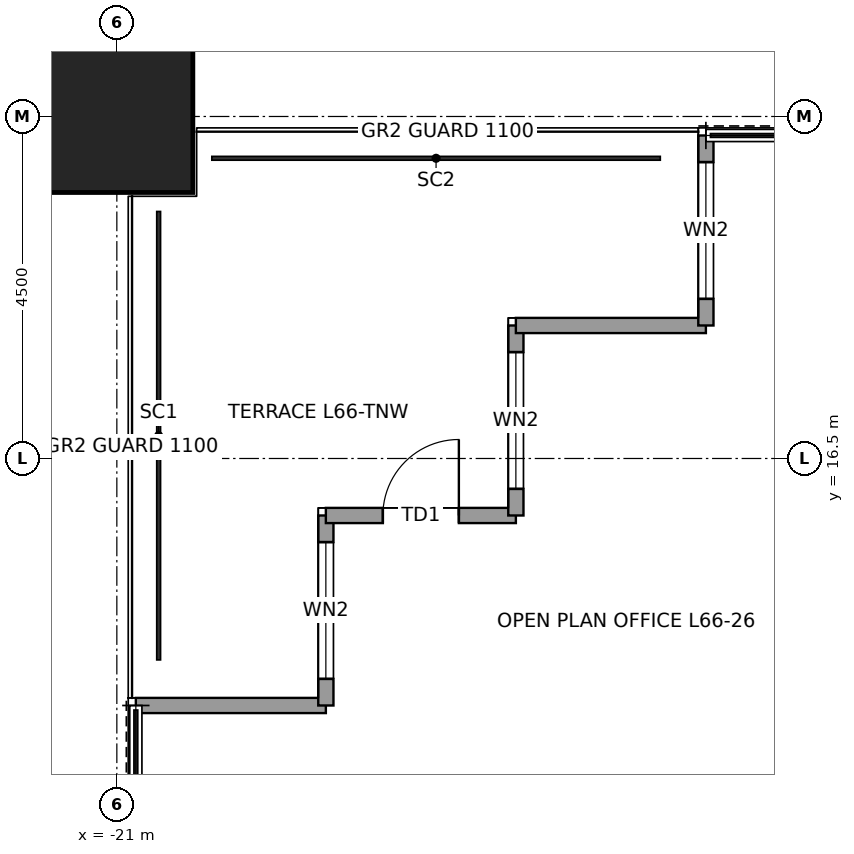
"""IFC4 building model, lengths in metres.
Left out: names, types, materials, properties, quantities, classifications, styles, units other than length and angle.
Written with IfcOpenShell. Run it as: python <this file> out.ifc"""

import sys

from ifc_helpers import new_model, si_unit, direction, frame, frame_2d, origin, origin_2d, place, context, subcontext, project, spatial, rectangle, hollow_rectangle, extrude, element, fill, save


model = new_model("IFC4")
c1 = context("Model", 3, precision=1e-05, world=origin(), true_north=direction((0.0, 1.0)))
c2 = subcontext(c1, "Body", "Model", "MODEL_VIEW")
j1 = project(units=[si_unit("LENGTHUNIT", "METRE"), si_unit("PLANEANGLEUNIT", "RADIAN")], contexts=[c1])
p1 = place(None, origin())
s1 = spatial("IfcSite", under=j1, at=p1, CompositionType="ELEMENT")
p2 = place(p1, origin())
s2 = spatial("IfcBuilding", under=s1, at=p2, CompositionType="ELEMENT")
p3 = place(p2, frame((0.0, 0.0, 299.9)))
s3 = spatial("IfcBuildingStorey", under=s2, at=p3, CompositionType="ELEMENT", Elevation=299.9)
p4 = place(p3, frame((-21.0, 21.0, 0.0), z_axis=(0.0, 0.0, 1.0), x_axis=(1.0, 0.0, 0.0)))
e1 = element("IfcColumn", 1, at=p4, inside=s3, PredefinedType="COLUMN", context=c2, shape_type="SweptSolid", body=[
    extrude(hollow_rectangle(XDim=2.0, YDim=2.0, WallThickness=0.095, at=origin_2d()), origin(), (0.0, 0.0, 1.0), 4.0),
])
p5 = place(p3, frame((-20.75, 13.25, 0.0), z_axis=(0.0, 0.0, 1.0), x_axis=(1.0, 0.0, 0.0)))
e2 = element("IfcWall", 2, at=p5, inside=s3, PredefinedType="SOLIDWALL", context=c2, shape_type="SweptSolid", body=[
    extrude(rectangle(XDim=2.5, YDim=0.2, at=frame_2d((1.25, 0.0))), origin(), (0.0, 0.0, 1.0), 3.85),
])
p6 = place(p3, frame((-18.25, 13.25, 0.0), z_axis=(0.0, 0.0, 1.0), x_axis=(0.0, 1.0, 0.0)))
e3 = element("IfcWall", 3, at=p6, inside=s3, PredefinedType="SOLIDWALL", context=c2, shape_type="SweptSolid", body=[
    extrude(rectangle(XDim=2.5, YDim=0.2, at=frame_2d((1.25, 0.0))), origin(), (0.0, 0.0, 1.0), 3.85),
])
p7 = place(p6, frame((0.35, 0.0, 0.3)))
e4 = element("IfcOpeningElement", 4, at=p7, cuts=e3, PredefinedType="OPENING", context=c2, shape_type="SweptSolid", body=[
    extrude(rectangle(XDim=1.8, YDim=2.4, at=frame_2d((0.9, 1.2))), frame((0.0, 0.11, 0.0), z_axis=(0.0, -1.0, 0.0), x_axis=(1.0, 0.0, 0.0)), (0.0, 0.0, 1.0), 0.22),
])
p8 = place(p3, frame((-18.25, 15.75, 0.0), z_axis=(0.0, 0.0, 1.0), x_axis=(1.0, 0.0, 0.0)))
e5 = element("IfcWall", 5, at=p8, inside=s3, PredefinedType="SOLIDWALL", context=c2, shape_type="SweptSolid", body=[
    extrude(rectangle(XDim=2.5, YDim=0.2, at=frame_2d((1.25, 0.0))), origin(), (0.0, 0.0, 1.0), 3.317),
])
p9 = place(p8, frame((0.75, 0.0, 0.0)))
e6 = element("IfcOpeningElement", 6, at=p9, cuts=e5, PredefinedType="OPENING", context=c2, shape_type="SweptSolid", body=[
    extrude(rectangle(XDim=1.0, YDim=2.4, at=frame_2d((0.5, 1.2))), frame((0.0, 0.11, 0.0), z_axis=(0.0, -1.0, 0.0), x_axis=(1.0, 0.0, 0.0)), (0.0, 0.0, 1.0), 0.22),
])
p10 = place(p3, frame((-15.75, 15.75, 0.0), z_axis=(0.0, 0.0, 1.0), x_axis=(0.0, 1.0, 0.0)))
e7 = element("IfcWall", 7, at=p10, inside=s3, PredefinedType="SOLIDWALL", context=c2, shape_type="SweptSolid", body=[
    extrude(rectangle(XDim=2.5, YDim=0.2, at=frame_2d((1.25, 0.0))), origin(), (0.0, 0.0, 1.0), 3.85),
])
p11 = place(p10, frame((0.35, 0.0, 0.3)))
e8 = element("IfcOpeningElement", 8, at=p11, cuts=e7, PredefinedType="OPENING", context=c2, shape_type="SweptSolid", body=[
    extrude(rectangle(XDim=1.8, YDim=2.4, at=frame_2d((0.9, 1.2))), frame((0.0, 0.11, 0.0), z_axis=(0.0, -1.0, 0.0), x_axis=(1.0, 0.0, 0.0)), (0.0, 0.0, 1.0), 0.22),
])
p12 = place(p3, frame((-15.75, 18.25, 0.0), z_axis=(0.0, 0.0, 1.0), x_axis=(1.0, 0.0, 0.0)))
e9 = element("IfcWall", 9, at=p12, inside=s3, PredefinedType="SOLIDWALL", context=c2, shape_type="SweptSolid", body=[
    extrude(rectangle(XDim=2.5, YDim=0.2, at=frame_2d((1.25, 0.0))), origin(), (0.0, 0.0, 1.0), 3.85),
])
p13 = place(p3, frame((-13.25, 18.25, 0.0), z_axis=(0.0, 0.0, 1.0), x_axis=(0.0, 1.0, 0.0)))
e10 = element("IfcWall", 10, at=p13, inside=s3, PredefinedType="SOLIDWALL", context=c2, shape_type="SweptSolid", body=[
    extrude(rectangle(XDim=2.5, YDim=0.2, at=frame_2d((1.25, 0.0))), origin(), (0.0, 0.0, 1.0), 3.85),
])
p14 = place(p13, frame((0.35, 0.0, 0.3)))
e11 = element("IfcOpeningElement", 11, at=p14, cuts=e10, PredefinedType="OPENING", context=c2, shape_type="SweptSolid", body=[
    extrude(rectangle(XDim=1.8, YDim=2.4, at=frame_2d((0.9, 1.2))), frame((0.0, 0.11, 0.0), z_axis=(0.0, -1.0, 0.0), x_axis=(1.0, 0.0, 0.0)), (0.0, 0.0, 1.0), 0.22),
])
p15 = place(p7, origin())
e12 = element("IfcWindow", 12, at=p15, inside=s3, PartitioningType="SINGLE_PANEL", PredefinedType="WINDOW", context=c2, shape_type="SweptSolid", body=[
    extrude(rectangle(XDim=1.8, YDim=2.4, at=frame_2d((0.9, 1.2))), frame((0.0, 0.03, 0.0), z_axis=(0.0, -1.0, 0.0), x_axis=(1.0, 0.0, 0.0)), (0.0, 0.0, 1.0), 0.06),
])
fill(e4, e12)
p16 = place(p9, origin())
e13 = element("IfcDoor", 13, at=p16, inside=s3, OperationType="SINGLE_SWING_RIGHT", PredefinedType="DOOR", context=c2, shape_type="SweptSolid", body=[
    extrude(rectangle(XDim=1.0, YDim=2.4, at=frame_2d((0.5, 1.2))), frame((0.0, 0.025, 0.0), z_axis=(0.0, -1.0, 0.0), x_axis=(1.0, 0.0, 0.0)), (0.0, 0.0, 1.0), 0.05),
])
fill(e6, e13)
p17 = place(p11, origin())
e14 = element("IfcWindow", 14, at=p17, inside=s3, PartitioningType="SINGLE_PANEL", PredefinedType="WINDOW", context=c2, shape_type="SweptSolid", body=[
    extrude(rectangle(XDim=1.8, YDim=2.4, at=frame_2d((0.9, 1.2))), frame((0.0, 0.03, 0.0), z_axis=(0.0, -1.0, 0.0), x_axis=(1.0, 0.0, 0.0)), (0.0, 0.0, 1.0), 0.06),
])
fill(e8, e14)
p18 = place(p14, origin())
e15 = element("IfcWindow", 15, at=p18, inside=s3, PartitioningType="SINGLE_PANEL", PredefinedType="WINDOW", context=c2, shape_type="SweptSolid", body=[
    extrude(rectangle(XDim=1.8, YDim=2.4, at=frame_2d((0.9, 1.2))), frame((0.0, 0.03, 0.0), z_axis=(0.0, -1.0, 0.0), x_axis=(1.0, 0.0, 0.0)), (0.0, 0.0, 1.0), 0.06),
])
fill(e11, e15)
save(model, sys.argv[1])
